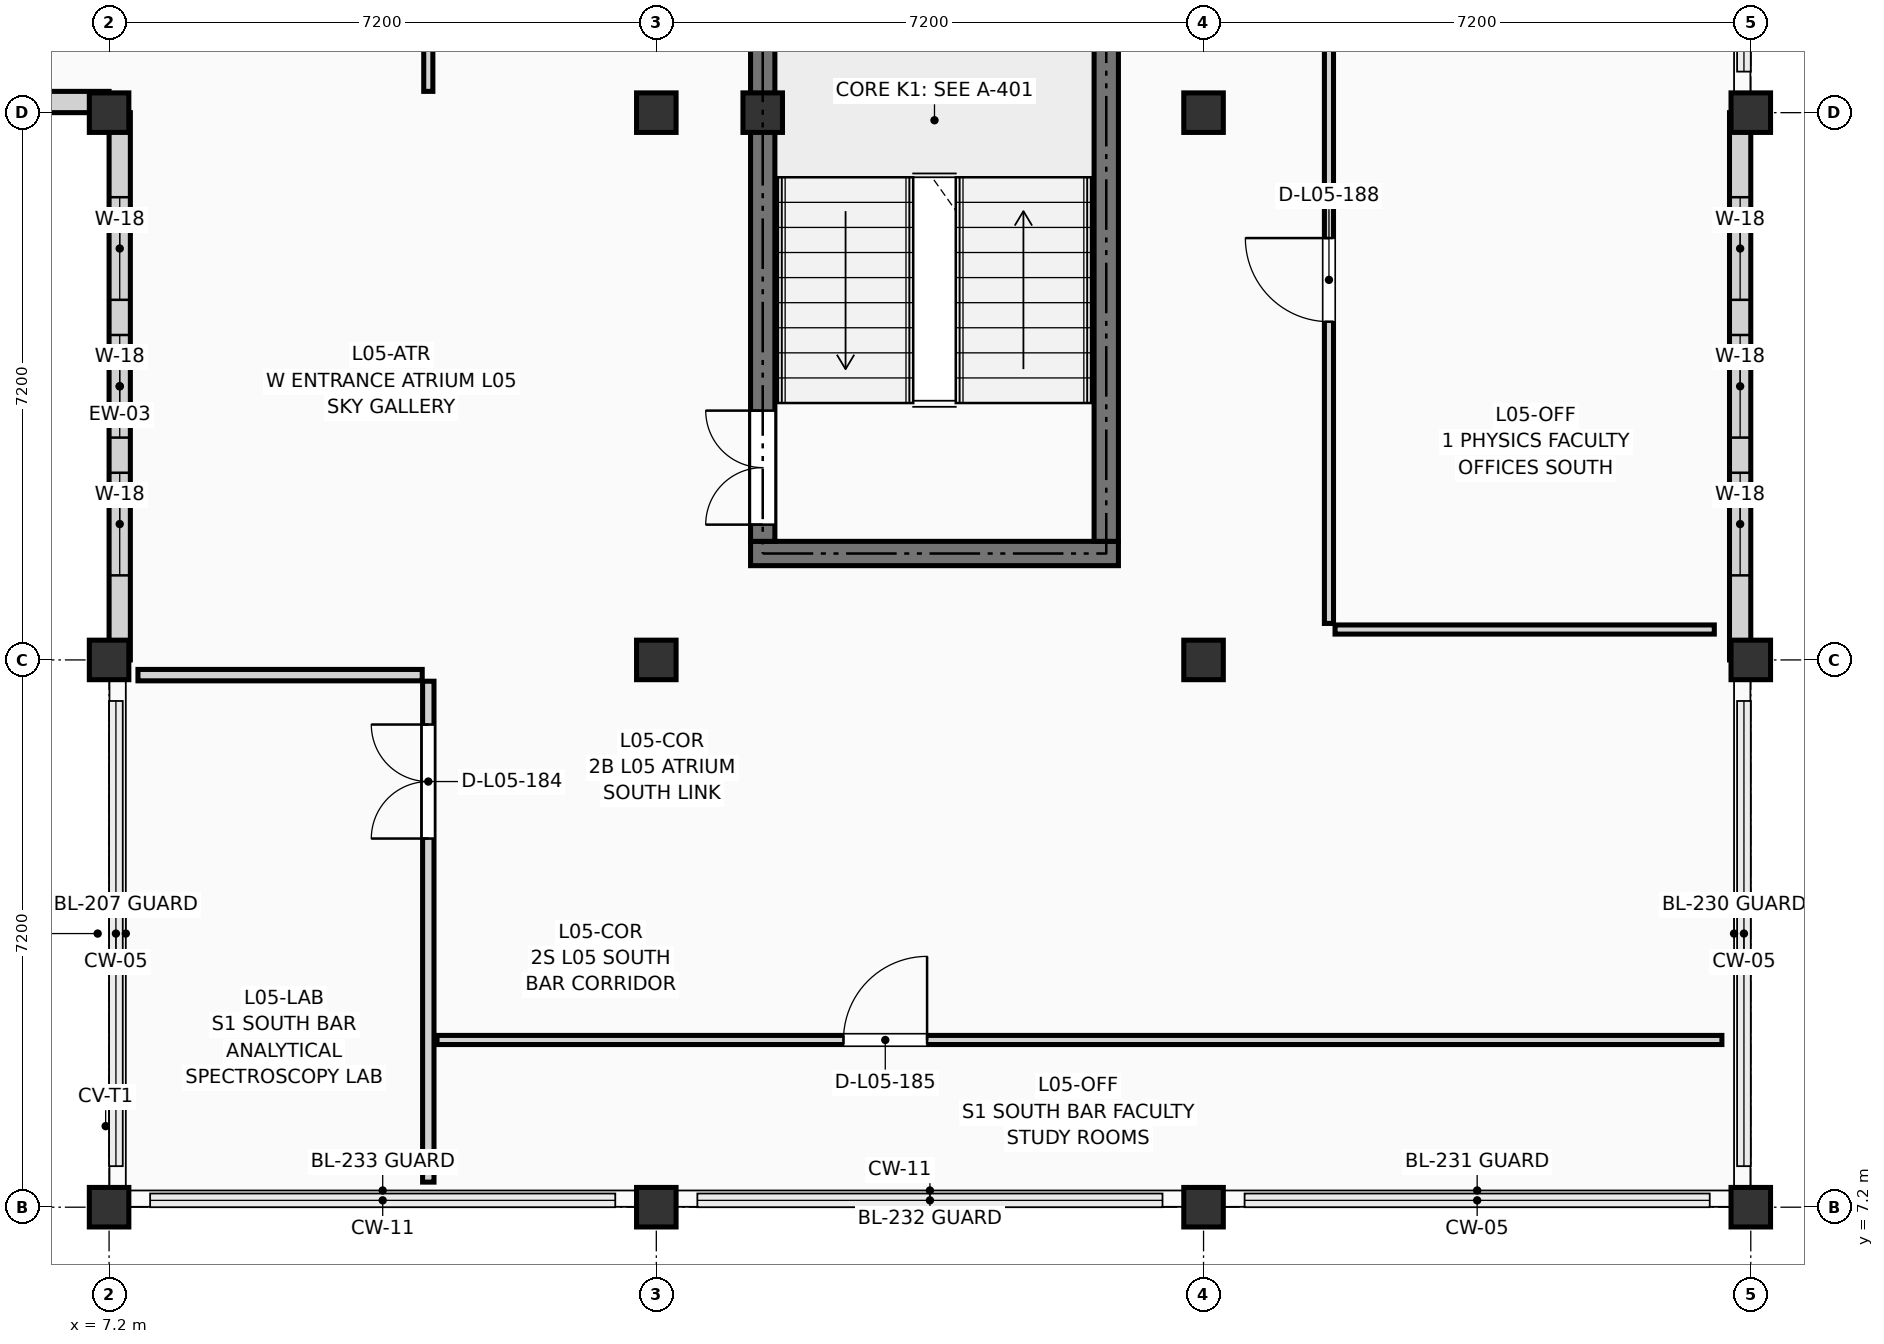
"""IFC4 building model, lengths in metres.
Left out: names, types, materials, properties, quantities, classifications, styles, units other than length and angle.
Written with IfcOpenShell. Run it as: python <this file> out.ifc"""

import sys

from ifc_helpers import new_model, si_unit, direction, frame, frame_2d, origin, origin_2d, place, context, subcontext, project, spatial, rectangle, extrude, element, fill, save


model = new_model("IFC4")
c1 = context("Model", 3, precision=1e-05, world=origin(), true_north=direction((0.0, 1.0)))
c2 = subcontext(c1, "Body", "Model", "MODEL_VIEW")
j1 = project(units=[si_unit("LENGTHUNIT", "METRE"), si_unit("PLANEANGLEUNIT", "RADIAN")], contexts=[c1])
p1 = place(None, origin())
s1 = spatial("IfcSite", under=j1, at=p1, CompositionType="ELEMENT")
p2 = place(p1, origin())
s2 = spatial("IfcBuilding", under=s1, at=p2, CompositionType="ELEMENT")
p3 = place(p2, frame((0.0, 0.0, 19.35)))
s3 = spatial("IfcBuildingStorey", under=s2, at=p3, CompositionType="ELEMENT", Elevation=19.35)
for number, where, z_axis, x_axis in (
    (1, (7.2, 7.2, 0.0), (0.0, 0.0, 1.0), (1.0, 0.0, 0.0)),
    (2, (7.2, 14.4, 0.0), (0.0, 0.0, 1.0), (1.0, 0.0, 0.0)),
    (3, (7.2, 21.6, 0.0), (0.0, 0.0, 1.0), (1.0, 0.0, 0.0)),
    (4, (14.4, 7.2, 0.0), (0.0, 0.0, 1.0), (1.0, 0.0, 0.0)),
    (5, (14.4, 14.4, 0.0), (0.0, 0.0, 1.0), (1.0, 0.0, 0.0)),
    (6, (14.4, 21.6, 0.0), (0.0, 0.0, 1.0), (1.0, 0.0, 0.0)),
    (7, (15.8, 21.6, 0.0), (0.0, 0.0, 1.0), (1.0, 0.0, 0.0)),
    (8, (21.6, 7.2, 0.0), (0.0, 0.0, 1.0), (1.0, 0.0, 0.0)),
    (9, (21.6, 14.4, 0.0), (0.0, 0.0, 1.0), (1.0, 0.0, 0.0)),
    (10, (21.6, 21.6, 0.0), (0.0, 0.0, 1.0), (1.0, 0.0, 0.0)),
    (11, (28.8, 7.2, 0.0), (0.0, 0.0, 1.0), (1.0, 0.0, 0.0)),
    (12, (28.8, 14.4, 0.0), (0.0, 0.0, 1.0), (1.0, 0.0, 0.0)),
    (13, (28.8, 21.6, 0.0), (0.0, 0.0, 1.0), (1.0, 0.0, 0.0)),
):
    element("IfcColumn", number, at=place(p3, frame(where, z_axis=z_axis, x_axis=x_axis)), inside=s3, PredefinedType="COLUMN", context=c2, shape_type="SweptSolid", body=[
        extrude(rectangle(XDim=0.52, YDim=0.52, at=origin_2d()), origin(), (0.0, 0.0, 1.0), 3.6),
    ])
p4 = place(p3, frame((7.34, 14.4, 0.0), z_axis=(0.0, 0.0, 1.0), x_axis=(0.0, 1.0, 0.0)))
e14 = element("IfcWall", 14, at=p4, inside=s3, PredefinedType="SOLIDWALL", context=c2, shape_type="SweptSolid", body=[
    extrude(rectangle(XDim=7.2, YDim=0.28, at=frame_2d((3.6, 0.0))), origin(), (0.0, 0.0, 1.0), 2.84),
])
p5 = place(p4, frame((1.113, 0.0, 0.18)))
e15 = element("IfcOpeningElement", 15, at=p5, cuts=e14, PredefinedType="OPENING", context=c2, shape_type="SweptSolid", body=[
    extrude(rectangle(XDim=1.35, YDim=2.45, at=frame_2d((0.675, 1.225))), frame((0.0, 0.152, 0.0), z_axis=(0.0, -1.0, 0.0), x_axis=(1.0, 0.0, 0.0)), (0.0, 0.0, 1.0), 0.304),
])
p6 = place(p4, frame((2.925, 0.0, 0.18)))
e16 = element("IfcOpeningElement", 16, at=p6, cuts=e14, PredefinedType="OPENING", context=c2, shape_type="SweptSolid", body=[
    extrude(rectangle(XDim=1.35, YDim=2.45, at=frame_2d((0.675, 1.225))), frame((0.0, 0.152, 0.0), z_axis=(0.0, -1.0, 0.0), x_axis=(1.0, 0.0, 0.0)), (0.0, 0.0, 1.0), 0.304),
])
p7 = place(p4, frame((4.738, 0.0, 0.18)))
e17 = element("IfcOpeningElement", 17, at=p7, cuts=e14, PredefinedType="OPENING", context=c2, shape_type="SweptSolid", body=[
    extrude(rectangle(XDim=1.35, YDim=2.45, at=frame_2d((0.675, 1.225))), frame((0.0, 0.152, 0.0), z_axis=(0.0, -1.0, 0.0), x_axis=(1.0, 0.0, 0.0)), (0.0, 0.0, 1.0), 0.304),
])
p8 = place(p3, frame((1.8, 21.74, 0.0), z_axis=(0.0, 0.0, 1.0), x_axis=(1.0, 0.0, 0.0)))
e18 = element("IfcWall", 18, at=p8, inside=s3, PredefinedType="SOLIDWALL", context=c2, shape_type="SweptSolid", body=[
    extrude(rectangle(XDim=5.4, YDim=0.28, at=frame_2d((2.7, 0.0))), origin(), (0.0, 0.0, 1.0), 2.696),
])
p9 = place(p8, frame((1.15, 0.0, 0.18)))
e19 = element("IfcOpeningElement", 19, at=p9, cuts=e18, PredefinedType="OPENING", context=c2, shape_type="SweptSolid", body=[
    extrude(rectangle(XDim=1.3, YDim=2.35, at=frame_2d((0.65, 1.175))), frame((0.0, 0.152, 0.0), z_axis=(0.0, -1.0, 0.0), x_axis=(1.0, 0.0, 0.0)), (0.0, 0.0, 1.0), 0.304),
])
p10 = place(p8, frame((2.95, 0.0, 0.18)))
e20 = element("IfcOpeningElement", 20, at=p10, cuts=e18, PredefinedType="OPENING", context=c2, shape_type="SweptSolid", body=[
    extrude(rectangle(XDim=1.3, YDim=2.35, at=frame_2d((0.65, 1.175))), frame((0.0, 0.152, 0.0), z_axis=(0.0, -1.0, 0.0), x_axis=(1.0, 0.0, 0.0)), (0.0, 0.0, 1.0), 0.304),
])
p11 = place(p3, frame((28.66, 14.4, 0.0), z_axis=(0.0, 0.0, 1.0), x_axis=(0.0, 1.0, 0.0)))
e21 = element("IfcWall", 21, at=p11, inside=s3, PredefinedType="SOLIDWALL", context=c2, shape_type="SweptSolid", body=[
    extrude(rectangle(XDim=7.2, YDim=0.28, at=frame_2d((3.6, 0.0))), origin(), (0.0, 0.0, 1.0), 2.84),
])
p12 = place(p11, frame((1.113, 0.0, 0.18)))
e22 = element("IfcOpeningElement", 22, at=p12, cuts=e21, PredefinedType="OPENING", context=c2, shape_type="SweptSolid", body=[
    extrude(rectangle(XDim=1.35, YDim=2.45, at=frame_2d((0.675, 1.225))), frame((0.0, 0.152, 0.0), z_axis=(0.0, -1.0, 0.0), x_axis=(1.0, 0.0, 0.0)), (0.0, 0.0, 1.0), 0.304),
])
p13 = place(p11, frame((2.925, 0.0, 0.18)))
e23 = element("IfcOpeningElement", 23, at=p13, cuts=e21, PredefinedType="OPENING", context=c2, shape_type="SweptSolid", body=[
    extrude(rectangle(XDim=1.35, YDim=2.45, at=frame_2d((0.675, 1.225))), frame((0.0, 0.152, 0.0), z_axis=(0.0, -1.0, 0.0), x_axis=(1.0, 0.0, 0.0)), (0.0, 0.0, 1.0), 0.304),
])
p14 = place(p11, frame((4.738, 0.0, 0.18)))
e24 = element("IfcOpeningElement", 24, at=p14, cuts=e21, PredefinedType="OPENING", context=c2, shape_type="SweptSolid", body=[
    extrude(rectangle(XDim=1.35, YDim=2.45, at=frame_2d((0.675, 1.225))), frame((0.0, 0.152, 0.0), z_axis=(0.0, -1.0, 0.0), x_axis=(1.0, 0.0, 0.0)), (0.0, 0.0, 1.0), 0.304),
])
p15 = place(p3, frame((15.64, 15.8, 0.0), z_axis=(0.0, 0.0, 1.0), x_axis=(1.0, 0.0, 0.0)))
e25 = element("IfcWall", 25, at=p15, inside=s3, PredefinedType="SHEAR", context=c2, shape_type="SweptSolid", body=[
    extrude(rectangle(XDim=4.84, YDim=0.32, at=frame_2d((2.42, 0.0))), origin(), (0.0, 0.0, 1.0), 3.39),
])
p16 = place(p3, frame((15.8, 15.96, 0.0), z_axis=(0.0, 0.0, 1.0), x_axis=(0.0, 1.0, 0.0)))
e26 = element("IfcWall", 26, at=p16, inside=s3, PredefinedType="SHEAR", context=c2, shape_type="SweptSolid", body=[
    extrude(rectangle(XDim=7.68, YDim=0.32, at=frame_2d((3.84, 0.0))), origin(), (0.0, 0.0, 1.0), 3.39),
])
p17 = place(p16, frame((0.22, 0.0, 0.0)))
e27 = element("IfcOpeningElement", 27, at=p17, cuts=e26, PredefinedType="OPENING", context=c2, shape_type="SweptSolid", body=[
    extrude(rectangle(XDim=1.5, YDim=2.2, at=frame_2d((0.75, 1.1))), frame((0.0, 0.172, 0.0), z_axis=(0.0, -1.0, 0.0), x_axis=(1.0, 0.0, 0.0)), (0.0, 0.0, 1.0), 0.344),
])
p18 = place(p3, frame((20.32, 15.96, 0.0), z_axis=(0.0, 0.0, 1.0), x_axis=(0.0, 1.0, 0.0)))
e28 = element("IfcWall", 28, at=p18, inside=s3, PredefinedType="SHEAR", context=c2, shape_type="SweptSolid", body=[
    extrude(rectangle(XDim=7.68, YDim=0.32, at=frame_2d((3.84, 0.0))), origin(), (0.0, 0.0, 1.0), 3.39),
])
p19 = place(p3, frame((11.4, 7.53, 0.0), z_axis=(0.0, 0.0, 1.0), x_axis=(0.0, 1.0, 0.0)))
e29 = element("IfcWall", 29, at=p19, inside=s3, PredefinedType="PARTITIONING", context=c2, shape_type="SweptSolid", body=[
    extrude(rectangle(XDim=6.59, YDim=0.15, at=frame_2d((3.295, 0.0))), origin(), (0.0, 0.0, 1.0), 3.375),
])
p20 = place(p19, frame((4.52, 0.0, 0.0)))
e30 = element("IfcOpeningElement", 30, at=p20, cuts=e29, PredefinedType="OPENING", context=c2, shape_type="SweptSolid", body=[
    extrude(rectangle(XDim=1.5, YDim=2.2, at=frame_2d((0.75, 1.1))), frame((0.0, 0.087, 0.0), z_axis=(0.0, -1.0, 0.0), x_axis=(1.0, 0.0, 0.0)), (0.0, 0.0, 1.0), 0.174),
])
p21 = place(p3, frame((7.58, 14.2, 0.0), z_axis=(0.0, 0.0, 1.0), x_axis=(1.0, 0.0, 0.0)))
e31 = element("IfcWall", 31, at=p21, inside=s3, PredefinedType="PARTITIONING", context=c2, shape_type="SweptSolid", body=[
    extrude(rectangle(XDim=3.74, YDim=0.15, at=frame_2d((1.87, 0.0))), origin(), (0.0, 0.0, 1.0), 2.691),
])
p22 = place(p3, frame((11.515, 9.4, 0.0), z_axis=(0.0, 0.0, 1.0), x_axis=(1.0, 0.0, 0.0)))
e32 = element("IfcWall", 32, at=p22, inside=s3, PredefinedType="PARTITIONING", context=c2, shape_type="SweptSolid", body=[
    extrude(rectangle(XDim=16.905, YDim=0.12, at=frame_2d((8.453, 0.0))), origin(), (0.0, 0.0, 1.0), 3.375),
])
p23 = place(p22, frame((5.347, 0.0, 0.0)))
e33 = element("IfcOpeningElement", 33, at=p23, cuts=e32, PredefinedType="OPENING", context=c2, shape_type="SweptSolid", body=[
    extrude(rectangle(XDim=1.1, YDim=2.15, at=frame_2d((0.55, 1.075))), frame((0.0, 0.072, 0.0), z_axis=(0.0, -1.0, 0.0), x_axis=(1.0, 0.0, 0.0)), (0.0, 0.0, 1.0), 0.144),
])
p24 = place(p3, frame((11.4, 21.88, 0.0), z_axis=(0.0, 0.0, 1.0), x_axis=(0.0, 1.0, 0.0)))
e34 = element("IfcWall", 34, at=p24, inside=s3, PredefinedType="PARTITIONING", context=c2, shape_type="SweptSolid", body=[
    extrude(rectangle(XDim=17.04, YDim=0.12, at=frame_2d((8.52, 0.0))), origin(), (0.0, 0.0, 1.0), 3.375),
])
p25 = place(p24, frame((7.92, 0.0, 0.0)))
e35 = element("IfcOpeningElement", 35, at=p25, cuts=e34, PredefinedType="OPENING", context=c2, shape_type="SweptSolid", body=[
    extrude(rectangle(XDim=1.2, YDim=2.15, at=frame_2d((0.6, 1.075))), frame((0.0, 0.072, 0.0), z_axis=(0.0, -1.0, 0.0), x_axis=(1.0, 0.0, 0.0)), (0.0, 0.0, 1.0), 0.144),
])
p26 = place(p3, frame((23.25, 14.88, 0.0), z_axis=(0.0, 0.0, 1.0), x_axis=(0.0, 1.0, 0.0)))
e36 = element("IfcWall", 36, at=p26, inside=s3, PredefinedType="PARTITIONING", context=c2, shape_type="SweptSolid", body=[
    extrude(rectangle(XDim=9.04, YDim=0.12, at=frame_2d((4.52, 0.0))), origin(), (0.0, 0.0, 1.0), 3.375),
])
p27 = place(p26, frame((3.97, 0.0, 0.0)))
e37 = element("IfcOpeningElement", 37, at=p27, cuts=e36, PredefinedType="OPENING", context=c2, shape_type="SweptSolid", body=[
    extrude(rectangle(XDim=1.1, YDim=2.15, at=frame_2d((0.55, 1.075))), frame((0.0, 0.072, 0.0), z_axis=(0.0, -1.0, 0.0), x_axis=(1.0, 0.0, 0.0)), (0.0, 0.0, 1.0), 0.144),
])
p28 = place(p3, frame((23.33, 14.8, 0.0), z_axis=(0.0, 0.0, 1.0), x_axis=(1.0, 0.0, 0.0)))
e38 = element("IfcWall", 38, at=p28, inside=s3, PredefinedType="PARTITIONING", context=c2, shape_type="SweptSolid", body=[
    extrude(rectangle(XDim=4.99, YDim=0.12, at=frame_2d((2.495, 0.0))), origin(), (0.0, 0.0, 1.0), 3.375),
])
p29 = place(p5, origin())
e39 = element("IfcWindow", 39, at=p29, inside=s3, PartitioningType="SINGLE_PANEL", PredefinedType="WINDOW", context=c2, shape_type="SweptSolid", body=[
    extrude(rectangle(XDim=1.35, YDim=2.45, at=frame_2d((0.675, 1.225))), frame((0.0, 0.03, 0.0), z_axis=(0.0, -1.0, 0.0), x_axis=(1.0, 0.0, 0.0)), (0.0, 0.0, 1.0), 0.06),
])
fill(e15, e39)
p30 = place(p6, origin())
e40 = element("IfcWindow", 40, at=p30, inside=s3, PartitioningType="SINGLE_PANEL", PredefinedType="WINDOW", context=c2, shape_type="SweptSolid", body=[
    extrude(rectangle(XDim=1.35, YDim=2.45, at=frame_2d((0.675, 1.225))), frame((0.0, 0.03, 0.0), z_axis=(0.0, -1.0, 0.0), x_axis=(1.0, 0.0, 0.0)), (0.0, 0.0, 1.0), 0.06),
])
fill(e16, e40)
p31 = place(p7, origin())
e41 = element("IfcWindow", 41, at=p31, inside=s3, PartitioningType="SINGLE_PANEL", PredefinedType="WINDOW", context=c2, shape_type="SweptSolid", body=[
    extrude(rectangle(XDim=1.35, YDim=2.45, at=frame_2d((0.675, 1.225))), frame((0.0, 0.03, 0.0), z_axis=(0.0, -1.0, 0.0), x_axis=(1.0, 0.0, 0.0)), (0.0, 0.0, 1.0), 0.06),
])
fill(e17, e41)
p32 = place(p12, origin())
e42 = element("IfcWindow", 42, at=p32, inside=s3, PartitioningType="SINGLE_PANEL", PredefinedType="WINDOW", context=c2, shape_type="SweptSolid", body=[
    extrude(rectangle(XDim=1.35, YDim=2.45, at=frame_2d((0.675, 1.225))), frame((0.0, 0.03, 0.0), z_axis=(0.0, -1.0, 0.0), x_axis=(1.0, 0.0, 0.0)), (0.0, 0.0, 1.0), 0.06),
])
fill(e22, e42)
p33 = place(p13, origin())
e43 = element("IfcWindow", 43, at=p33, inside=s3, PartitioningType="SINGLE_PANEL", PredefinedType="WINDOW", context=c2, shape_type="SweptSolid", body=[
    extrude(rectangle(XDim=1.35, YDim=2.45, at=frame_2d((0.675, 1.225))), frame((0.0, 0.03, 0.0), z_axis=(0.0, -1.0, 0.0), x_axis=(1.0, 0.0, 0.0)), (0.0, 0.0, 1.0), 0.06),
])
fill(e23, e43)
p34 = place(p14, origin())
e44 = element("IfcWindow", 44, at=p34, inside=s3, PartitioningType="SINGLE_PANEL", PredefinedType="WINDOW", context=c2, shape_type="SweptSolid", body=[
    extrude(rectangle(XDim=1.35, YDim=2.45, at=frame_2d((0.675, 1.225))), frame((0.0, 0.03, 0.0), z_axis=(0.0, -1.0, 0.0), x_axis=(1.0, 0.0, 0.0)), (0.0, 0.0, 1.0), 0.06),
])
fill(e24, e44)
p35 = place(p17, origin())
e45 = element("IfcDoor", 45, at=p35, inside=s3, OperationType="DOUBLE_DOOR_SINGLE_SWING", PredefinedType="DOOR", context=c2, shape_type="SweptSolid", body=[
    extrude(rectangle(XDim=1.5, YDim=2.2, at=frame_2d((0.75, 1.1))), frame((0.0, 0.025, 0.0), z_axis=(0.0, -1.0, 0.0), x_axis=(1.0, 0.0, 0.0)), (0.0, 0.0, 1.0), 0.05),
])
fill(e27, e45)
p36 = place(p20, origin())
e46 = element("IfcDoor", 46, at=p36, inside=s3, OperationType="DOUBLE_DOOR_SINGLE_SWING", PredefinedType="DOOR", context=c2, shape_type="SweptSolid", body=[
    extrude(rectangle(XDim=1.5, YDim=2.2, at=frame_2d((0.75, 1.1))), frame((0.0, 0.025, 0.0), z_axis=(0.0, -1.0, 0.0), x_axis=(1.0, 0.0, 0.0)), (0.0, 0.0, 1.0), 0.05),
])
fill(e30, e46)
p37 = place(p23, origin())
e47 = element("IfcDoor", 47, at=p37, inside=s3, OperationType="SINGLE_SWING_RIGHT", PredefinedType="DOOR", context=c2, shape_type="SweptSolid", body=[
    extrude(rectangle(XDim=1.1, YDim=2.15, at=frame_2d((0.55, 1.075))), frame((0.0, 0.025, 0.0), z_axis=(0.0, -1.0, 0.0), x_axis=(1.0, 0.0, 0.0)), (0.0, 0.0, 1.0), 0.05),
])
fill(e33, e47)
p38 = place(p27, origin())
e48 = element("IfcDoor", 48, at=p38, inside=s3, OperationType="SINGLE_SWING_RIGHT", PredefinedType="DOOR", context=c2, shape_type="SweptSolid", body=[
    extrude(rectangle(XDim=1.1, YDim=2.15, at=frame_2d((0.55, 1.075))), frame((0.0, 0.025, 0.0), z_axis=(0.0, -1.0, 0.0), x_axis=(1.0, 0.0, 0.0)), (0.0, 0.0, 1.0), 0.05),
])
fill(e37, e48)
save(model, sys.argv[1])
